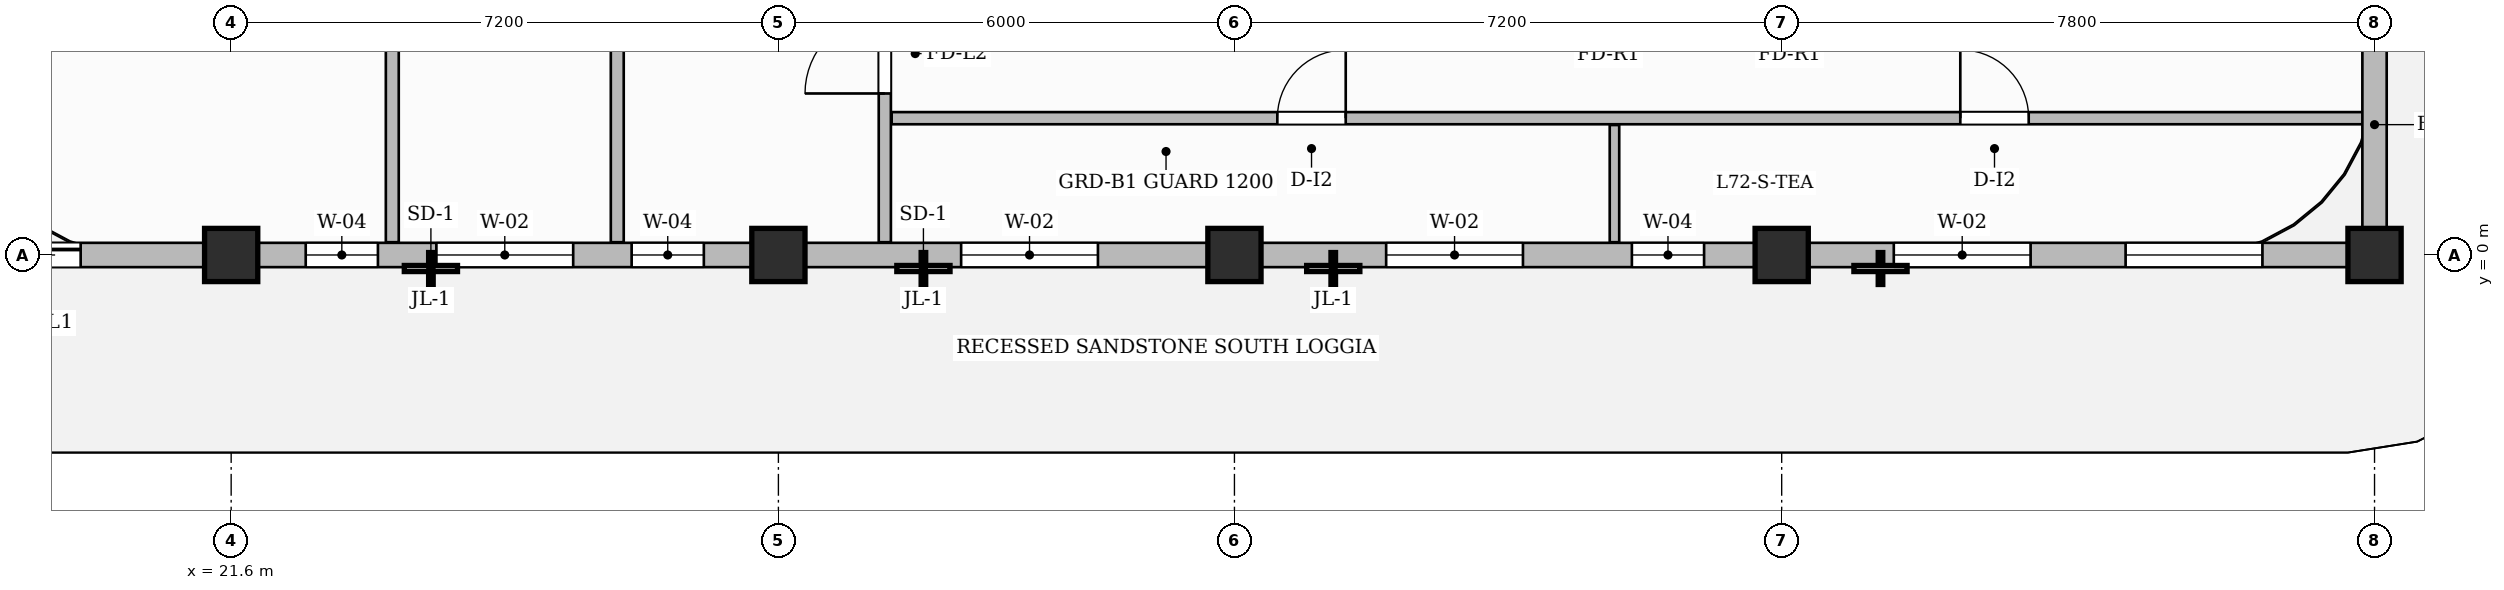
"""IFC4 building model, lengths in metres.
Left out: names, types, materials, properties, quantities, classifications, styles, units other than length and angle.
Written with IfcOpenShell. Run it as: python <this file> out.ifc"""

import sys

from ifc_helpers import new_model, si_unit, direction, frame, frame_2d, origin, origin_2d, place, context, subcontext, project, spatial, rectangle, extrude, source, transform, mapped, element, fill, save


model = new_model("IFC4")
c1 = context("Model", 3, precision=1e-05, world=origin(), true_north=direction((0.0, 1.0)))
c2 = subcontext(c1, "Body", "Model", "MODEL_VIEW")
j1 = project(units=[si_unit("LENGTHUNIT", "METRE"), si_unit("PLANEANGLEUNIT", "RADIAN")], contexts=[c1])
p1 = place(None, origin())
s1 = spatial("IfcSite", under=j1, at=p1, CompositionType="ELEMENT")
p2 = place(p1, origin())
s2 = spatial("IfcBuilding", under=s1, at=p2, CompositionType="ELEMENT")
p3 = place(p2, frame((0.0, 0.0, 286.6)))
s3 = spatial("IfcBuildingStorey", under=s2, at=p3, CompositionType="ELEMENT", Elevation=286.6)
m1 = source(origin(), c2, "Body", "SweptSolid", [
    extrude(rectangle(XDim=0.7, YDim=0.7, at=origin_2d()), origin(), (0.0, 0.0, 1.0), 3.85),
])
for number, where, z_axis, x_axis in (
    (1, (21.6, 0.0, 0.0), (0.0, 0.0, 1.0), (1.0, 0.0, 0.0)),
    (2, (28.8, 0.0, 0.0), (0.0, 0.0, 1.0), (1.0, 0.0, 0.0)),
    (3, (34.8, 0.0, 0.0), (0.0, 0.0, 1.0), (1.0, 0.0, 0.0)),
    (4, (42.0, 0.0, 0.0), (0.0, 0.0, 1.0), (1.0, 0.0, 0.0)),
    (5, (49.8, 0.0, 0.0), (0.0, 0.0, 1.0), (1.0, 0.0, 0.0)),
):
    element("IfcColumn", number, at=place(p3, frame(where, z_axis=z_axis, x_axis=x_axis)), inside=s3, PredefinedType="COLUMN", context=c2, shape_type="MappedRepresentation", body=[
        mapped(m1, transform((0.0, 0.0, 0.0), scale=1.0)),
    ])
p4 = place(p3, frame((30.2, 0.168, 0.0), z_axis=(0.0, 0.0, 1.0), x_axis=(0.0, 1.0, 0.0)))
e6 = element("IfcWall", 6, at=p4, inside=s3, PredefinedType="PARTITIONING", context=c2, shape_type="SweptSolid", body=[
    extrude(rectangle(XDim=8.892, YDim=0.16, at=frame_2d((4.446, 0.0))), origin(), (0.0, 0.0, 1.0), 3.6),
])
p5 = place(p4, frame((1.957, 0.0, 0.0)))
e7 = element("IfcOpeningElement", 7, at=p5, cuts=e6, PredefinedType="OPENING", context=c2, shape_type="SweptSolid", body=[
    extrude(rectangle(XDim=1.05, YDim=2.15, at=frame_2d((0.525, 1.075))), frame((0.0, 0.09, 0.0), z_axis=(0.0, -1.0, 0.0), x_axis=(1.0, 0.0, 0.0)), (0.0, 0.0, 1.0), 0.18),
])
p6 = place(p3, frame((30.29, 1.8, 0.0), z_axis=(0.0, 0.0, 1.0), x_axis=(1.0, 0.0, 0.0)))
e8 = element("IfcWall", 8, at=p6, inside=s3, PredefinedType="PARTITIONING", context=c2, shape_type="SweptSolid", body=[
    extrude(rectangle(XDim=19.37, YDim=0.16, at=frame_2d((9.685, 0.0))), origin(), (0.0, 0.0, 1.0), 3.6),
])
p7 = place(p6, frame((5.074, 0.0, 0.0)))
e9 = element("IfcOpeningElement", 9, at=p7, cuts=e8, PredefinedType="OPENING", context=c2, shape_type="SweptSolid", body=[
    extrude(rectangle(XDim=0.9, YDim=2.15, at=frame_2d((0.45, 1.075))), frame((0.0, 0.09, 0.0), z_axis=(0.0, -1.0, 0.0), x_axis=(1.0, 0.0, 0.0)), (0.0, 0.0, 1.0), 0.18),
])
p8 = place(p6, frame((14.06, 0.0, 0.0)))
e10 = element("IfcOpeningElement", 10, at=p8, cuts=e8, PredefinedType="OPENING", context=c2, shape_type="SweptSolid", body=[
    extrude(rectangle(XDim=0.9, YDim=2.15, at=frame_2d((0.45, 1.075))), frame((0.0, 0.09, 0.0), z_axis=(0.0, -1.0, 0.0), x_axis=(1.0, 0.0, 0.0)), (0.0, 0.0, 1.0), 0.18),
])
p9 = place(p3, frame((39.8, 0.168, 0.0), z_axis=(0.0, 0.0, 1.0), x_axis=(0.0, 1.0, 0.0)))
e11 = element("IfcWall", 11, at=p9, inside=s3, PredefinedType="PARTITIONING", context=c2, shape_type="SweptSolid", body=[
    extrude(rectangle(XDim=1.542, YDim=0.125, at=frame_2d((0.771, 0.0))), origin(), (0.0, 0.0, 1.0), 3.6),
])
for number, where, z_axis, x_axis in (
    (12, (23.72, 0.168, 0.0), (0.0, 0.0, 1.0), (0.0, 1.0, 0.0)),
    (13, (26.68, 0.168, 0.0), (0.0, 0.0, 1.0), (0.0, 1.0, 0.0)),
):
    element("IfcWall", number, at=place(p3, frame(where, z_axis=z_axis, x_axis=x_axis)), inside=s3, PredefinedType="PARTITIONING", context=c2, shape_type="SweptSolid", body=[
        extrude(rectangle(XDim=8.892, YDim=0.17, at=frame_2d((4.446, 0.0))), origin(), (0.0, 0.0, 1.0), 3.6),
    ])
p10 = place(p3, frame((18.0, 0.0, 0.0), z_axis=(0.0, 0.0, 1.0), x_axis=(1.0, 0.0, 0.0)))
e14 = element("IfcWall", 14, at=p10, inside=s3, PredefinedType="SOLIDWALL", context=c2, shape_type="SweptSolid", body=[
    extrude(rectangle(XDim=31.8, YDim=0.32, at=frame_2d((15.9, 0.0))), origin(), (0.0, 0.0, 1.0), 3.185),
])
p11 = place(p10, frame((0.42, 0.0, 0.0)))
e15 = element("IfcOpeningElement", 15, at=p11, cuts=e14, PredefinedType="OPENING", context=c2, shape_type="SweptSolid", body=[
    extrude(rectangle(XDim=1.2, YDim=2.2, at=frame_2d((0.6, 1.1))), frame((0.0, 0.17, 0.0), z_axis=(0.0, -1.0, 0.0), x_axis=(1.0, 0.0, 0.0)), (0.0, 0.0, 1.0), 0.34),
])
p12 = place(p10, frame((4.581, 0.0, 0.8)))
e16 = element("IfcOpeningElement", 16, at=p12, cuts=e14, PredefinedType="OPENING", context=c2, shape_type="SweptSolid", body=[
    extrude(rectangle(XDim=0.95, YDim=1.75, at=frame_2d((0.475, 0.875))), frame((0.0, 0.17, 0.0), z_axis=(0.0, -1.0, 0.0), x_axis=(1.0, 0.0, 0.0)), (0.0, 0.0, 1.0), 0.34),
])
p13 = place(p10, frame((6.3, 0.0, 0.8)))
e17 = element("IfcOpeningElement", 17, at=p13, cuts=e14, PredefinedType="OPENING", context=c2, shape_type="SweptSolid", body=[
    extrude(rectangle(XDim=1.8, YDim=1.85, at=frame_2d((0.9, 0.925))), frame((0.0, 0.17, 0.0), z_axis=(0.0, -1.0, 0.0), x_axis=(1.0, 0.0, 0.0)), (0.0, 0.0, 1.0), 0.34),
])
p14 = place(p10, frame((8.869, 0.0, 0.8)))
e18 = element("IfcOpeningElement", 18, at=p14, cuts=e14, PredefinedType="OPENING", context=c2, shape_type="SweptSolid", body=[
    extrude(rectangle(XDim=0.95, YDim=1.75, at=frame_2d((0.475, 0.875))), frame((0.0, 0.17, 0.0), z_axis=(0.0, -1.0, 0.0), x_axis=(1.0, 0.0, 0.0)), (0.0, 0.0, 1.0), 0.34),
])
p15 = place(p10, frame((13.204, 0.0, 0.8)))
e19 = element("IfcOpeningElement", 19, at=p15, cuts=e14, PredefinedType="OPENING", context=c2, shape_type="SweptSolid", body=[
    extrude(rectangle(XDim=1.8, YDim=1.85, at=frame_2d((0.9, 0.925))), frame((0.0, 0.17, 0.0), z_axis=(0.0, -1.0, 0.0), x_axis=(1.0, 0.0, 0.0)), (0.0, 0.0, 1.0), 0.34),
])
p16 = place(p10, frame((18.796, 0.0, 0.8)))
e20 = element("IfcOpeningElement", 20, at=p16, cuts=e14, PredefinedType="OPENING", context=c2, shape_type="SweptSolid", body=[
    extrude(rectangle(XDim=1.8, YDim=1.85, at=frame_2d((0.9, 0.925))), frame((0.0, 0.17, 0.0), z_axis=(0.0, -1.0, 0.0), x_axis=(1.0, 0.0, 0.0)), (0.0, 0.0, 1.0), 0.34),
])
p17 = place(p10, frame((22.029, 0.0, 0.8)))
e21 = element("IfcOpeningElement", 21, at=p17, cuts=e14, PredefinedType="OPENING", context=c2, shape_type="SweptSolid", body=[
    extrude(rectangle(XDim=0.95, YDim=1.75, at=frame_2d((0.475, 0.875))), frame((0.0, 0.17, 0.0), z_axis=(0.0, -1.0, 0.0), x_axis=(1.0, 0.0, 0.0)), (0.0, 0.0, 1.0), 0.34),
])
p18 = place(p10, frame((25.475, 0.0, 0.8)))
e22 = element("IfcOpeningElement", 22, at=p18, cuts=e14, PredefinedType="OPENING", context=c2, shape_type="SweptSolid", body=[
    extrude(rectangle(XDim=1.8, YDim=1.85, at=frame_2d((0.9, 0.925))), frame((0.0, 0.17, 0.0), z_axis=(0.0, -1.0, 0.0), x_axis=(1.0, 0.0, 0.0)), (0.0, 0.0, 1.0), 0.34),
])
p19 = place(p10, frame((28.525, 0.0, 0.8)))
e23 = element("IfcOpeningElement", 23, at=p19, cuts=e14, PredefinedType="OPENING", context=c2, shape_type="SweptSolid", body=[
    extrude(rectangle(XDim=1.8, YDim=1.85, at=frame_2d((0.9, 0.925))), frame((0.0, 0.17, 0.0), z_axis=(0.0, -1.0, 0.0), x_axis=(1.0, 0.0, 0.0)), (0.0, 0.0, 1.0), 0.34),
])
p20 = place(p3, frame((49.8, 0.05, 0.0), z_axis=(0.0, 0.0, 1.0), x_axis=(0.0, 1.0, 0.0)))
e24 = element("IfcWall", 24, at=p20, inside=s3, PredefinedType="SOLIDWALL", context=c2, shape_type="SweptSolid", body=[
    extrude(rectangle(XDim=3.33, YDim=0.32, at=frame_2d((1.665, 0.0))), origin(), (0.0, 0.0, 1.0), 3.6),
])
m2 = source(origin(), c2, "Body", "SweptSolid", [
    extrude(rectangle(XDim=1.05, YDim=2.15, at=frame_2d((0.525, 1.075))), frame((0.0, 0.025, 0.0), z_axis=(0.0, -1.0, 0.0), x_axis=(1.0, 0.0, 0.0)), (0.0, 0.0, 1.0), 0.05),
])
p21 = place(p5, origin())
e25 = element("IfcDoor", 25, at=p21, inside=s3, OperationType="SINGLE_SWING_LEFT", PredefinedType="DOOR", context=c2, shape_type="MappedRepresentation", body=[
    mapped(m2, transform((0.0, 0.0, 0.0), scale=1.0)),
])
fill(e7, e25)
m3 = source(origin(), c2, "Body", "SweptSolid", [
    extrude(rectangle(XDim=0.9, YDim=2.15, at=frame_2d((0.45, 1.075))), frame((0.0, 0.025, 0.0), z_axis=(0.0, -1.0, 0.0), x_axis=(1.0, 0.0, 0.0)), (0.0, 0.0, 1.0), 0.05),
])
p22 = place(p7, origin())
e26 = element("IfcDoor", 26, at=p22, inside=s3, OperationType="SINGLE_SWING_RIGHT", PredefinedType="DOOR", context=c2, shape_type="MappedRepresentation", body=[
    mapped(m3, transform((0.0, 0.0, 0.0), scale=1.0)),
])
fill(e9, e26)
p23 = place(p8, origin())
e27 = element("IfcDoor", 27, at=p23, inside=s3, OperationType="SINGLE_SWING_LEFT", PredefinedType="DOOR", context=c2, shape_type="MappedRepresentation", body=[
    mapped(m3, transform((0.0, 0.0, 0.0), scale=1.0)),
])
fill(e10, e27)
m4 = source(origin(), c2, "Body", "SweptSolid", [
    extrude(rectangle(XDim=1.2, YDim=2.2, at=frame_2d((0.6, 1.1))), frame((0.0, 0.025, 0.0), z_axis=(0.0, -1.0, 0.0), x_axis=(1.0, 0.0, 0.0)), (0.0, 0.0, 1.0), 0.05),
])
p24 = place(p11, origin())
e28 = element("IfcDoor", 28, at=p24, inside=s3, OperationType="SLIDING_TO_LEFT", PredefinedType="DOOR", context=c2, shape_type="MappedRepresentation", body=[
    mapped(m4, transform((0.0, 0.0, 0.0), scale=1.0)),
])
fill(e15, e28)
m5 = source(origin(), c2, "Body", "SweptSolid", [
    extrude(rectangle(XDim=0.95, YDim=1.75, at=frame_2d((0.475, 0.875))), frame((0.0, 0.03, 0.0), z_axis=(0.0, -1.0, 0.0), x_axis=(1.0, 0.0, 0.0)), (0.0, 0.0, 1.0), 0.06),
])
p25 = place(p12, origin())
e29 = element("IfcWindow", 29, at=p25, inside=s3, PartitioningType="SINGLE_PANEL", PredefinedType="WINDOW", context=c2, shape_type="MappedRepresentation", body=[
    mapped(m5, transform((0.0, 0.0, 0.0), scale=1.0)),
])
fill(e16, e29)
m6 = source(origin(), c2, "Body", "SweptSolid", [
    extrude(rectangle(XDim=1.8, YDim=1.85, at=frame_2d((0.9, 0.925))), frame((0.0, 0.03, 0.0), z_axis=(0.0, -1.0, 0.0), x_axis=(1.0, 0.0, 0.0)), (0.0, 0.0, 1.0), 0.06),
])
p26 = place(p13, origin())
e30 = element("IfcWindow", 30, at=p26, inside=s3, PartitioningType="DOUBLE_PANEL_VERTICAL", PredefinedType="WINDOW", context=c2, shape_type="MappedRepresentation", body=[
    mapped(m6, transform((0.0, 0.0, 0.0), scale=1.0)),
])
fill(e17, e30)
p27 = place(p14, origin())
e31 = element("IfcWindow", 31, at=p27, inside=s3, PartitioningType="SINGLE_PANEL", PredefinedType="WINDOW", context=c2, shape_type="MappedRepresentation", body=[
    mapped(m5, transform((0.0, 0.0, 0.0), scale=1.0)),
])
fill(e18, e31)
p28 = place(p15, origin())
e32 = element("IfcWindow", 32, at=p28, inside=s3, PartitioningType="DOUBLE_PANEL_VERTICAL", PredefinedType="WINDOW", context=c2, shape_type="MappedRepresentation", body=[
    mapped(m6, transform((0.0, 0.0, 0.0), scale=1.0)),
])
fill(e19, e32)
p29 = place(p16, origin())
e33 = element("IfcWindow", 33, at=p29, inside=s3, PartitioningType="DOUBLE_PANEL_VERTICAL", PredefinedType="WINDOW", context=c2, shape_type="MappedRepresentation", body=[
    mapped(m6, transform((0.0, 0.0, 0.0), scale=1.0)),
])
fill(e20, e33)
p30 = place(p17, origin())
e34 = element("IfcWindow", 34, at=p30, inside=s3, PartitioningType="SINGLE_PANEL", PredefinedType="WINDOW", context=c2, shape_type="MappedRepresentation", body=[
    mapped(m5, transform((0.0, 0.0, 0.0), scale=1.0)),
])
fill(e21, e34)
p31 = place(p18, origin())
e35 = element("IfcWindow", 35, at=p31, inside=s3, PartitioningType="DOUBLE_PANEL_VERTICAL", PredefinedType="WINDOW", context=c2, shape_type="MappedRepresentation", body=[
    mapped(m6, transform((0.0, 0.0, 0.0), scale=1.0)),
])
fill(e22, e35)
p32 = place(p19, origin())
e36 = element("IfcWindow", 36, at=p32, inside=s3, PartitioningType="DOUBLE_PANEL_VERTICAL", PredefinedType="WINDOW", context=c2, shape_type="MappedRepresentation", body=[
    mapped(m6, transform((0.0, 0.0, 0.0), scale=1.0)),
])
fill(e23, e36)
save(model, sys.argv[1])
